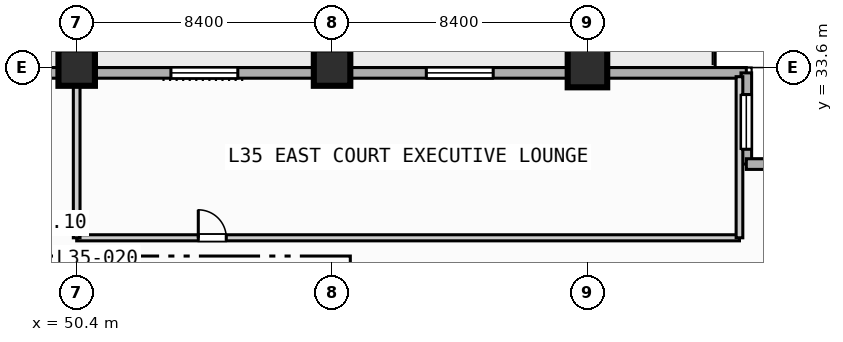
"""IFC4 building model, lengths in metres.
Left out: names, types, materials, properties, quantities, classifications, styles, units other than length and angle.
Written with IfcOpenShell. Run it as: python <this file> out.ifc"""

import sys

from ifc_helpers import new_model, si_unit, direction, frame, frame_2d, origin, origin_2d, place, context, subcontext, project, spatial, rectangle, extrude, element, fill, save


model = new_model("IFC4")
c1 = context("Model", 3, precision=1e-05, world=origin(), true_north=direction((0.0, 1.0)))
c2 = subcontext(c1, "Body", "Model", "MODEL_VIEW")
j1 = project(units=[si_unit("LENGTHUNIT", "METRE"), si_unit("PLANEANGLEUNIT", "RADIAN")], contexts=[c1])
p1 = place(None, origin())
s1 = spatial("IfcSite", under=j1, at=p1, CompositionType="ELEMENT")
p2 = place(p1, origin())
s2 = spatial("IfcBuilding", under=s1, at=p2, CompositionType="ELEMENT")
p3 = place(p2, frame((0.0, 0.0, 145.6)))
s3 = spatial("IfcBuildingStorey", under=s2, at=p3, CompositionType="ELEMENT", Elevation=145.6)
for number, where, z_axis, x_axis in (
    (1, (50.4, 33.6, 0.0), (0.0, 0.0, 1.0), (1.0, 0.0, 0.0)),
    (2, (58.8, 33.6, 0.0), (0.0, 0.0, 1.0), (1.0, 0.0, 0.0)),
):
    element("IfcColumn", number, at=place(p3, frame(where, z_axis=z_axis, x_axis=x_axis)), inside=s3, PredefinedType="COLUMN", context=c2, shape_type="SweptSolid", body=[
        extrude(rectangle(XDim=1.2, YDim=1.2, at=origin_2d()), origin(), (0.0, 0.0, 1.0), 3.8),
    ])
p4 = place(p3, frame((67.2, 33.6, 0.0), z_axis=(0.0, 0.0, 1.0), x_axis=(1.0, 0.0, 0.0)))
e3 = element("IfcColumn", 3, at=p4, inside=s3, PredefinedType="COLUMN", context=c2, shape_type="SweptSolid", body=[
    extrude(rectangle(XDim=1.3, YDim=1.3, at=origin_2d()), origin(), (0.0, 0.0, 1.0), 3.8),
])
p5 = place(p3, frame((33.425, 33.425, 0.0), z_axis=(0.0, 0.0, 1.0), x_axis=(1.0, 0.0, 0.0)))
e4 = element("IfcWall", 4, at=p5, inside=s3, PredefinedType="STANDARD", context=c2, shape_type="SweptSolid", body=[
    extrude(rectangle(XDim=39.0, YDim=0.35, at=frame_2d((19.5, 0.0))), origin(), (0.0, 0.0, 1.0), 3.55),
])
p6 = place(p5, frame((12.075, 0.0, 0.0)))
e5 = element("IfcOpeningElement", 5, at=p6, cuts=e4, PredefinedType="OPENING", context=c2, shape_type="SweptSolid", body=[
    extrude(rectangle(XDim=1.4, YDim=2.2, at=frame_2d((0.7, 1.1))), frame((0.0, 0.185, 0.0), z_axis=(0.0, -1.0, 0.0), x_axis=(1.0, 0.0, 0.0)), (0.0, 0.0, 1.0), 0.37),
])
p7 = place(p5, frame((20.075, 0.0, 0.85)))
e6 = element("IfcOpeningElement", 6, at=p7, cuts=e4, PredefinedType="OPENING", context=c2, shape_type="SweptSolid", body=[
    extrude(rectangle(XDim=2.2, YDim=1.8, at=frame_2d((1.1, 0.9))), frame((0.0, 0.185, 0.0), z_axis=(0.0, -1.0, 0.0), x_axis=(1.0, 0.0, 0.0)), (0.0, 0.0, 1.0), 0.37),
])
p8 = place(p5, frame((28.475, 0.0, 0.85)))
e7 = element("IfcOpeningElement", 7, at=p8, cuts=e4, PredefinedType="OPENING", context=c2, shape_type="SweptSolid", body=[
    extrude(rectangle(XDim=2.2, YDim=1.8, at=frame_2d((1.1, 0.9))), frame((0.0, 0.185, 0.0), z_axis=(0.0, -1.0, 0.0), x_axis=(1.0, 0.0, 0.0)), (0.0, 0.0, 1.0), 0.37),
])
p9 = place(p3, frame((72.425, 33.425, 0.0), z_axis=(0.0, 0.0, 1.0), x_axis=(0.0, -1.0, 0.0)))
e8 = element("IfcWall", 8, at=p9, inside=s3, PredefinedType="STANDARD", context=c2, shape_type="SweptSolid", body=[
    extrude(rectangle(XDim=3.0, YDim=0.35, at=frame_2d((1.5, 0.0))), origin(), (0.0, 0.0, 1.0), 3.55),
])
p10 = place(p9, frame((0.712, 0.0, 0.85)))
e9 = element("IfcOpeningElement", 9, at=p10, cuts=e8, PredefinedType="OPENING", context=c2, shape_type="SweptSolid", body=[
    extrude(rectangle(XDim=1.8, YDim=1.8, at=frame_2d((0.9, 0.9))), frame((0.0, 0.185, 0.0), z_axis=(0.0, -1.0, 0.0), x_axis=(1.0, 0.0, 0.0)), (0.0, 0.0, 1.0), 0.37),
])
p11 = place(p3, frame((72.425, 30.425, 0.0), z_axis=(0.0, 0.0, 1.0), x_axis=(1.0, 0.0, 0.0)))
e10 = element("IfcWall", 10, at=p11, inside=s3, PredefinedType="STANDARD", context=c2, shape_type="SweptSolid", body=[
    extrude(rectangle(XDim=3.0, YDim=0.35, at=frame_2d((1.5, 0.0))), origin(), (0.0, 0.0, 1.0), 3.55),
])
p12 = place(p3, frame((50.4, 28.0, 0.0), z_axis=(0.0, 0.0, 1.0), x_axis=(1.0, 0.0, 0.0)))
e11 = element("IfcWall", 11, at=p12, inside=s3, PredefinedType="PARTITIONING", context=c2, shape_type="SweptSolid", body=[
    extrude(rectangle(XDim=21.8, YDim=0.2, at=frame_2d((10.9, 0.0))), origin(), (0.0, 0.0, 1.0), 3.55),
])
p13 = place(p12, frame((4.0, 0.0, 0.0)))
e12 = element("IfcOpeningElement", 12, at=p13, cuts=e11, PredefinedType="OPENING", context=c2, shape_type="SweptSolid", body=[
    extrude(rectangle(XDim=0.92, YDim=2.1, at=frame_2d((0.46, 1.05))), frame((0.0, 0.11, 0.0), z_axis=(0.0, -1.0, 0.0), x_axis=(1.0, 0.0, 0.0)), (0.0, 0.0, 1.0), 0.22),
])
p14 = place(p3, frame((50.4, 28.0, 0.0), z_axis=(0.0, 0.0, 1.0), x_axis=(0.0, 1.0, 0.0)))
e13 = element("IfcWall", 13, at=p14, inside=s3, PredefinedType="PARTITIONING", context=c2, shape_type="SweptSolid", body=[
    extrude(rectangle(XDim=5.3, YDim=0.22, at=frame_2d((2.65, 0.0))), origin(), (0.0, 0.0, 1.0), 3.133),
])
p15 = place(p3, frame((72.2, 28.0, 0.0), z_axis=(0.0, 0.0, 1.0), x_axis=(0.0, 1.0, 0.0)))
e14 = element("IfcWall", 14, at=p15, inside=s3, PredefinedType="PARTITIONING", context=c2, shape_type="SweptSolid", body=[
    extrude(rectangle(XDim=5.3, YDim=0.22, at=frame_2d((2.65, 0.0))), origin(), (0.0, 0.0, 1.0), 3.55),
])
p16 = place(p7, origin())
e15 = element("IfcWindow", 15, at=p16, inside=s3, PartitioningType="SINGLE_PANEL", PredefinedType="WINDOW", context=c2, shape_type="SweptSolid", body=[
    extrude(rectangle(XDim=2.2, YDim=1.8, at=frame_2d((1.1, 0.9))), frame((0.0, 0.03, 0.0), z_axis=(0.0, -1.0, 0.0), x_axis=(1.0, 0.0, 0.0)), (0.0, 0.0, 1.0), 0.06),
])
fill(e6, e15)
p17 = place(p8, origin())
e16 = element("IfcWindow", 16, at=p17, inside=s3, PartitioningType="SINGLE_PANEL", PredefinedType="WINDOW", context=c2, shape_type="SweptSolid", body=[
    extrude(rectangle(XDim=2.2, YDim=1.8, at=frame_2d((1.1, 0.9))), frame((0.0, 0.03, 0.0), z_axis=(0.0, -1.0, 0.0), x_axis=(1.0, 0.0, 0.0)), (0.0, 0.0, 1.0), 0.06),
])
fill(e7, e16)
p18 = place(p10, origin())
e17 = element("IfcWindow", 17, at=p18, inside=s3, PartitioningType="SINGLE_PANEL", PredefinedType="WINDOW", context=c2, shape_type="SweptSolid", body=[
    extrude(rectangle(XDim=1.8, YDim=1.8, at=frame_2d((0.9, 0.9))), frame((0.0, 0.03, 0.0), z_axis=(0.0, -1.0, 0.0), x_axis=(1.0, 0.0, 0.0)), (0.0, 0.0, 1.0), 0.06),
])
fill(e9, e17)
p19 = place(p13, origin())
e18 = element("IfcDoor", 18, at=p19, inside=s3, OperationType="SINGLE_SWING_LEFT", PredefinedType="DOOR", context=c2, shape_type="SweptSolid", body=[
    extrude(rectangle(XDim=0.92, YDim=2.1, at=frame_2d((0.46, 1.05))), frame((0.0, 0.025, 0.0), z_axis=(0.0, -1.0, 0.0), x_axis=(1.0, 0.0, 0.0)), (0.0, 0.0, 1.0), 0.05),
])
fill(e12, e18)
save(model, sys.argv[1])
